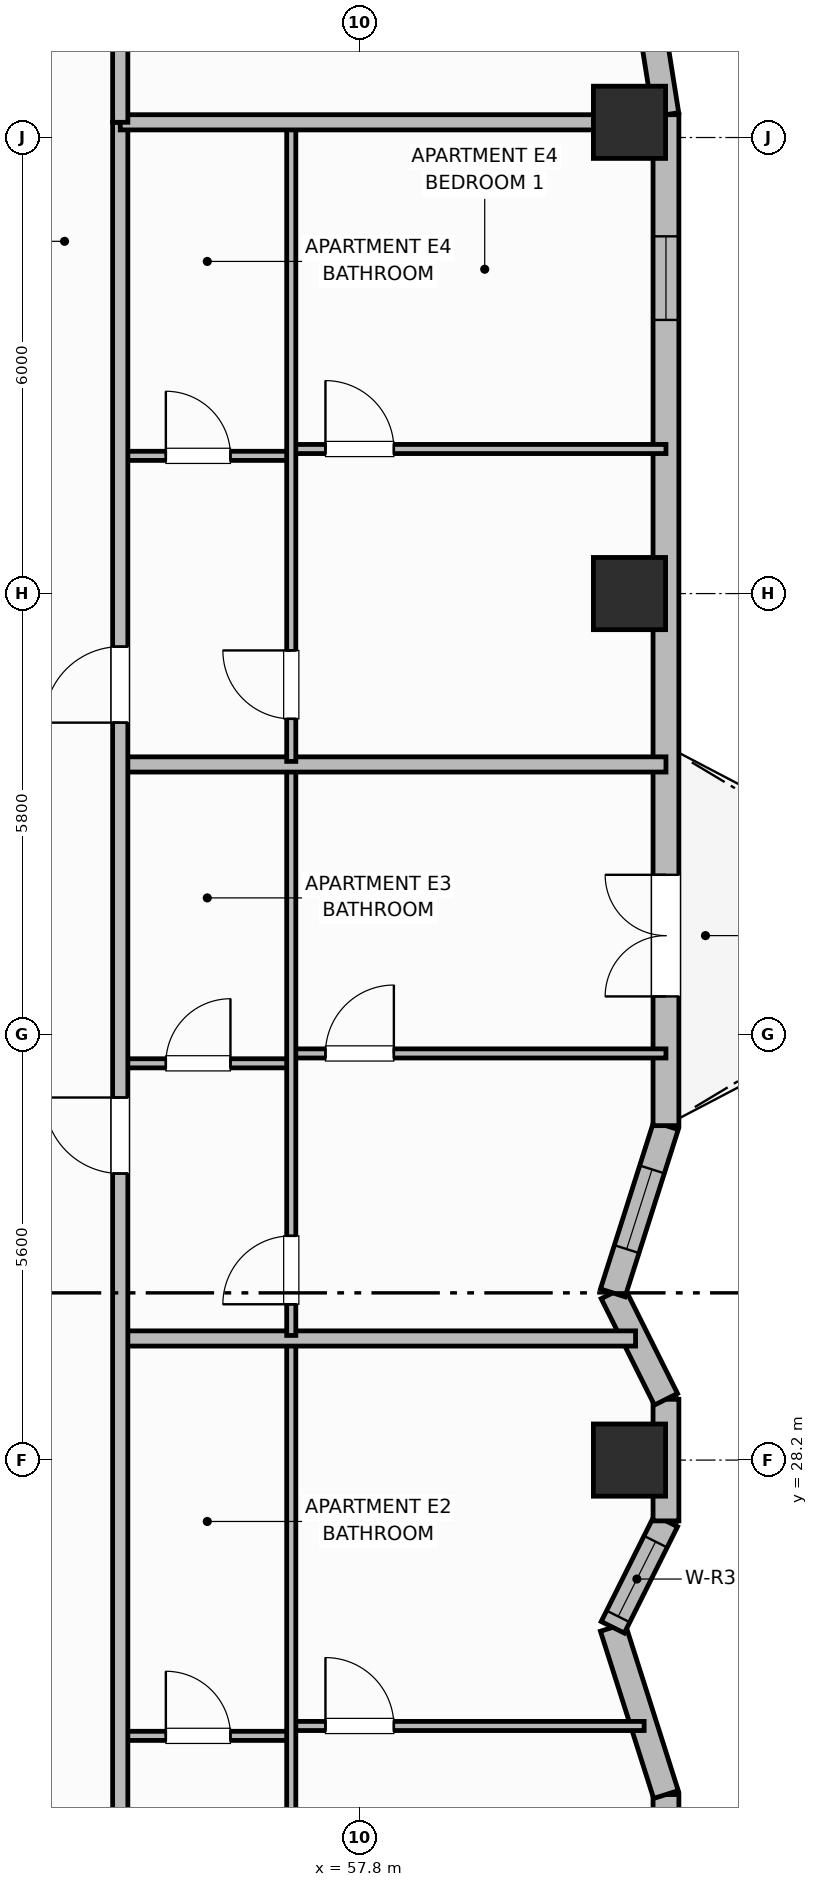
"""IFC4 building model, lengths in metres.
Left out: names, types, materials, properties, quantities, classifications, styles, units other than length and angle.
Written with IfcOpenShell. Run it as: python <this file> out.ifc"""

import sys

from ifc_helpers import new_model, si_unit, direction, frame, frame_2d, origin, origin_2d, place, context, subcontext, project, spatial, rectangle, extrude, element, fill, save


model = new_model("IFC4")
c1 = context("Model", 3, precision=1e-05, world=origin(), true_north=direction((0.0, 1.0)))
c2 = subcontext(c1, "Body", "Model", "MODEL_VIEW")
j1 = project(units=[si_unit("LENGTHUNIT", "METRE"), si_unit("PLANEANGLEUNIT", "RADIAN")], contexts=[c1])
p1 = place(None, origin())
s1 = spatial("IfcSite", under=j1, at=p1, CompositionType="ELEMENT")
p2 = place(p1, origin())
s2 = spatial("IfcBuilding", under=s1, at=p2, CompositionType="ELEMENT")
p3 = place(p2, frame((0.0, 0.0, 184.8)))
s3 = spatial("IfcBuildingStorey", under=s2, at=p3, CompositionType="ELEMENT", Elevation=184.8)
for number, where, z_axis, x_axis in (
    (1, (61.35, 28.2, 0.0), (0.0, 0.0, 1.0), (1.0, 0.0, 0.0)),
    (2, (61.35, 39.6, 0.0), (0.0, 0.0, 1.0), (1.0, 0.0, 0.0)),
    (3, (61.35, 45.8, 0.0), (0.0, 0.0, 1.0), (1.0, 0.0, 0.0)),
):
    element("IfcColumn", number, at=place(p3, frame(where, z_axis=z_axis, x_axis=x_axis)), inside=s3, PredefinedType="COLUMN", context=c2, shape_type="SweptSolid", body=[
        extrude(rectangle(XDim=0.95, YDim=0.95, at=origin_2d()), origin(), (0.0, 0.0, 1.0), 3.7),
    ])
p4 = place(p3, frame((61.83, 10.5, 0.0), z_axis=(0.0, 0.0, 1.0), x_axis=(0.0, 1.0, 0.0)))
e4 = element("IfcWall", 4, at=p4, inside=s3, PredefinedType="SOLIDWALL", context=c2, shape_type="SweptSolid", body=[
    extrude(rectangle(XDim=13.3, YDim=0.34, at=frame_2d((6.65, 0.0))), origin(), (0.0, 0.0, 1.0), 2.72),
])
p5 = place(p4, frame((1.45, 0.0, 0.75)))
e5 = element("IfcOpeningElement", 5, at=p5, cuts=e4, PredefinedType="OPENING", context=c2, shape_type="SweptSolid", body=[
    extrude(rectangle(XDim=1.4, YDim=1.85, at=frame_2d((0.7, 0.925))), frame((0.0, 0.18, 0.0), z_axis=(0.0, -1.0, 0.0), x_axis=(1.0, 0.0, 0.0)), (0.0, 0.0, 1.0), 0.36),
])
p6 = place(p4, frame((6.84, 0.0, 0.71)))
e6 = element("IfcOpeningElement", 6, at=p6, cuts=e4, PredefinedType="OPENING", context=c2, shape_type="SweptSolid", body=[
    extrude(rectangle(XDim=1.4, YDim=1.85, at=frame_2d((0.7, 0.925))), frame((0.0, 0.18, 0.0), z_axis=(0.0, -1.0, 0.0), x_axis=(1.0, 0.0, 0.0)), (0.0, 0.0, 1.0), 0.36),
])
p7 = place(p4, frame((10.45, 0.0, 0.75)))
e7 = element("IfcOpeningElement", 7, at=p7, cuts=e4, PredefinedType="OPENING", context=c2, shape_type="SweptSolid", body=[
    extrude(rectangle(XDim=1.4, YDim=1.85, at=frame_2d((0.7, 0.925))), frame((0.0, 0.18, 0.0), z_axis=(0.0, -1.0, 0.0), x_axis=(1.0, 0.0, 0.0)), (0.0, 0.0, 1.0), 0.36),
])
p8 = place(p3, frame((61.83, 23.8, 0.0), z_axis=(0.0, 0.0, 1.0), x_axis=(-0.303286588318, 0.95289938889, 0.0)))
e8 = element("IfcWall", 8, at=p8, inside=s3, PredefinedType="SOLIDWALL", context=c2, shape_type="SweptSolid", body=[
    extrude(rectangle(XDim=2.309, YDim=0.34, at=frame_2d((1.154, 0.0))), origin(), (0.0, 0.0, 1.0), 2.72),
])
p9 = place(p3, frame((61.13, 26.0, 0.0), z_axis=(0.0, 0.0, 1.0), x_axis=(0.447338371726, 0.894364792007, 0.0)))
e9 = element("IfcWall", 9, at=p9, inside=s3, PredefinedType="SOLIDWALL", context=c2, shape_type="SweptSolid", body=[
    extrude(rectangle(XDim=1.565, YDim=0.34, at=frame_2d((0.783, 0.0))), origin(), (0.0, 0.0, 1.0), 2.72),
])
p10 = place(p9, frame((0.16, 0.0, 0.91)))
e10 = element("IfcOpeningElement", 10, at=p10, cuts=e9, PredefinedType="OPENING", context=c2, shape_type="SweptSolid", body=[
    extrude(rectangle(XDim=1.1, YDim=1.65, at=frame_2d((0.55, 0.825))), frame((0.0, 0.18, 0.0), z_axis=(0.0, -1.0, 0.0), x_axis=(1.0, 0.0, 0.0)), (0.0, 0.0, 1.0), 0.36),
])
p11 = place(p3, frame((61.83, 27.4, 0.0), z_axis=(0.0, 0.0, 1.0), x_axis=(0.0, 1.0, 0.0)))
e11 = element("IfcWall", 11, at=p11, inside=s3, PredefinedType="SOLIDWALL", context=c2, shape_type="SweptSolid", body=[
    extrude(rectangle(XDim=1.6, YDim=0.34, at=frame_2d((0.8, 0.0))), origin(), (0.0, 0.0, 1.0), 2.72),
])
p12 = place(p3, frame((61.83, 29.0, 0.0), z_axis=(0.0, 0.0, 1.0), x_axis=(-0.447338371726, 0.894364792007, 0.0)))
e12 = element("IfcWall", 12, at=p12, inside=s3, PredefinedType="SOLIDWALL", context=c2, shape_type="SweptSolid", body=[
    extrude(rectangle(XDim=1.565, YDim=0.34, at=frame_2d((0.783, 0.0))), origin(), (0.0, 0.0, 1.0), 2.72),
])
p13 = place(p3, frame((61.13, 30.4, 0.0), z_axis=(0.0, 0.0, 1.0), x_axis=(0.303256029766, 0.952909114454, 0.0)))
e13 = element("IfcWall", 13, at=p13, inside=s3, PredefinedType="SOLIDWALL", context=c2, shape_type="SweptSolid", body=[
    extrude(rectangle(XDim=2.309, YDim=0.34, at=frame_2d((1.154, 0.0))), origin(), (0.0, 0.0, 1.0), 2.72),
])
p14 = place(p13, frame((0.604, 0.0, 0.91)))
e14 = element("IfcOpeningElement", 14, at=p14, cuts=e13, PredefinedType="OPENING", context=c2, shape_type="SweptSolid", body=[
    extrude(rectangle(XDim=1.1, YDim=1.65, at=frame_2d((0.55, 0.825))), frame((0.0, 0.18, 0.0), z_axis=(0.0, -1.0, 0.0), x_axis=(1.0, 0.0, 0.0)), (0.0, 0.0, 1.0), 0.36),
])
p15 = place(p3, frame((61.83, 32.6, 0.0), z_axis=(0.0, 0.0, 1.0), x_axis=(0.0, 1.0, 0.0)))
e15 = element("IfcWall", 15, at=p15, inside=s3, PredefinedType="SOLIDWALL", context=c2, shape_type="SweptSolid", body=[
    extrude(rectangle(XDim=13.3, YDim=0.34, at=frame_2d((6.65, 0.0))), origin(), (0.0, 0.0, 1.0), 2.72),
])
p16 = place(p15, frame((1.7, 0.0, 0.0)))
e16 = element("IfcOpeningElement", 16, at=p16, cuts=e15, PredefinedType="OPENING", context=c2, shape_type="SweptSolid", body=[
    extrude(rectangle(XDim=1.6, YDim=2.1, at=frame_2d((0.8, 1.05))), frame((0.0, 0.18, 0.0), z_axis=(0.0, -1.0, 0.0), x_axis=(1.0, 0.0, 0.0)), (0.0, 0.0, 1.0), 0.36),
])
p17 = place(p15, frame((10.6, 0.0, 0.95)))
e17 = element("IfcOpeningElement", 17, at=p17, cuts=e15, PredefinedType="OPENING", context=c2, shape_type="SweptSolid", body=[
    extrude(rectangle(XDim=1.1, YDim=1.65, at=frame_2d((0.55, 0.825))), frame((0.0, 0.18, 0.0), z_axis=(0.0, -1.0, 0.0), x_axis=(1.0, 0.0, 0.0)), (0.0, 0.0, 1.0), 0.36),
])
p18 = place(p3, frame((61.83, 45.9, 0.0), z_axis=(0.0, 0.0, 1.0), x_axis=(-0.156481329164, 0.987680916907, 0.0)))
e18 = element("IfcWall", 18, at=p18, inside=s3, PredefinedType="SOLIDWALL", context=c2, shape_type="SweptSolid", body=[
    extrude(rectangle(XDim=1.136, YDim=0.34, at=frame_2d((0.568, 0.0))), origin(), (0.0, 0.0, 1.0), 2.72),
])
p19 = place(p3, frame((54.65, 24.572, 0.0), z_axis=(0.0, 0.0, 1.0), x_axis=(1.0, 0.0, 0.0)))
e19 = element("IfcWall", 19, at=p19, inside=s3, PredefinedType="PARTITIONING", context=c2, shape_type="SweptSolid", body=[
    extrude(rectangle(XDim=2.25, YDim=0.12, at=frame_2d((1.125, 0.0))), origin(), (0.0, 0.0, 1.0), 2.55),
])
p20 = place(p19, frame((0.6, 0.0, 0.0)))
e20 = element("IfcOpeningElement", 20, at=p20, cuts=e19, PredefinedType="OPENING", context=c2, shape_type="SweptSolid", body=[
    extrude(rectangle(XDim=0.85, YDim=2.1, at=frame_2d((0.425, 1.05))), frame((0.0, 0.07, 0.0), z_axis=(0.0, -1.0, 0.0), x_axis=(1.0, 0.0, 0.0)), (0.0, 0.0, 1.0), 0.14),
])
p21 = place(p3, frame((56.9, 24.702, 0.0), z_axis=(0.0, 0.0, 1.0), x_axis=(1.0, 0.0, 0.0)))
e21 = element("IfcWall", 21, at=p21, inside=s3, PredefinedType="PARTITIONING", context=c2, shape_type="SweptSolid", body=[
    extrude(rectangle(XDim=4.643, YDim=0.12, at=frame_2d((2.322, 0.0))), origin(), (0.0, 0.0, 1.0), 2.55),
])
p22 = place(p21, frame((0.45, 0.0, 0.0)))
e22 = element("IfcOpeningElement", 22, at=p22, cuts=e21, PredefinedType="OPENING", context=c2, shape_type="SweptSolid", body=[
    extrude(rectangle(XDim=0.9, YDim=2.1, at=frame_2d((0.45, 1.05))), frame((0.0, 0.07, 0.0), z_axis=(0.0, -1.0, 0.0), x_axis=(1.0, 0.0, 0.0)), (0.0, 0.0, 1.0), 0.14),
])
p23 = place(p3, frame((56.9, 19.792, 0.0), z_axis=(0.0, 0.0, 1.0), x_axis=(0.0, 1.0, 0.0)))
e23 = element("IfcWall", 23, at=p23, inside=s3, PredefinedType="PARTITIONING", context=c2, shape_type="SweptSolid", body=[
    extrude(rectangle(XDim=9.968, YDim=0.12, at=frame_2d((4.984, 0.0))), origin(), (0.0, 0.0, 1.0), 2.55),
])
p24 = place(p23, frame((0.41, 0.0, 0.0)))
e24 = element("IfcOpeningElement", 24, at=p24, cuts=e23, PredefinedType="OPENING", context=c2, shape_type="SweptSolid", body=[
    extrude(rectangle(XDim=0.9, YDim=2.1, at=frame_2d((0.45, 1.05))), frame((0.0, 0.07, 0.0), z_axis=(0.0, -1.0, 0.0), x_axis=(1.0, 0.0, 0.0)), (0.0, 0.0, 1.0), 0.14),
])
p25 = place(p3, frame((54.65, 29.8, 0.0), z_axis=(0.0, 0.0, 1.0), x_axis=(1.0, 0.0, 0.0)))
e25 = element("IfcWall", 25, at=p25, inside=s3, PredefinedType="PARTITIONING", context=c2, shape_type="SweptSolid", body=[
    extrude(rectangle(XDim=6.78, YDim=0.2, at=frame_2d((3.39, 0.0))), origin(), (0.0, 0.0, 1.0), 2.55),
])
p26 = place(p3, frame((54.65, 33.42, 0.0), z_axis=(0.0, 0.0, 1.0), x_axis=(1.0, 0.0, 0.0)))
e26 = element("IfcWall", 26, at=p26, inside=s3, PredefinedType="PARTITIONING", context=c2, shape_type="SweptSolid", body=[
    extrude(rectangle(XDim=2.25, YDim=0.12, at=frame_2d((1.125, 0.0))), origin(), (0.0, 0.0, 1.0), 2.55),
])
p27 = place(p26, frame((0.6, 0.0, 0.0)))
e27 = element("IfcOpeningElement", 27, at=p27, cuts=e26, PredefinedType="OPENING", context=c2, shape_type="SweptSolid", body=[
    extrude(rectangle(XDim=0.85, YDim=2.1, at=frame_2d((0.425, 1.05))), frame((0.0, 0.07, 0.0), z_axis=(0.0, -1.0, 0.0), x_axis=(1.0, 0.0, 0.0)), (0.0, 0.0, 1.0), 0.14),
])
p28 = place(p3, frame((56.9, 33.55, 0.0), z_axis=(0.0, 0.0, 1.0), x_axis=(1.0, 0.0, 0.0)))
e28 = element("IfcWall", 28, at=p28, inside=s3, PredefinedType="PARTITIONING", context=c2, shape_type="SweptSolid", body=[
    extrude(rectangle(XDim=4.93, YDim=0.12, at=frame_2d((2.465, 0.0))), origin(), (0.0, 0.0, 1.0), 2.55),
])
p29 = place(p28, frame((0.45, 0.0, 0.0)))
e29 = element("IfcOpeningElement", 29, at=p29, cuts=e28, PredefinedType="OPENING", context=c2, shape_type="SweptSolid", body=[
    extrude(rectangle(XDim=0.9, YDim=2.1, at=frame_2d((0.45, 1.05))), frame((0.0, 0.07, 0.0), z_axis=(0.0, -1.0, 0.0), x_axis=(1.0, 0.0, 0.0)), (0.0, 0.0, 1.0), 0.14),
])
p30 = place(p3, frame((56.9, 29.84, 0.0), z_axis=(0.0, 0.0, 1.0), x_axis=(0.0, 1.0, 0.0)))
e30 = element("IfcWall", 30, at=p30, inside=s3, PredefinedType="PARTITIONING", context=c2, shape_type="SweptSolid", body=[
    extrude(rectangle(XDim=7.472, YDim=0.12, at=frame_2d((3.736, 0.0))), origin(), (0.0, 0.0, 1.0), 2.55),
])
p31 = place(p30, frame((0.41, 0.0, 0.0)))
e31 = element("IfcOpeningElement", 31, at=p31, cuts=e30, PredefinedType="OPENING", context=c2, shape_type="SweptSolid", body=[
    extrude(rectangle(XDim=0.9, YDim=2.1, at=frame_2d((0.45, 1.05))), frame((0.0, 0.07, 0.0), z_axis=(0.0, -1.0, 0.0), x_axis=(1.0, 0.0, 0.0)), (0.0, 0.0, 1.0), 0.14),
])
p32 = place(p3, frame((54.65, 37.352, 0.0), z_axis=(0.0, 0.0, 1.0), x_axis=(1.0, 0.0, 0.0)))
e32 = element("IfcWall", 32, at=p32, inside=s3, PredefinedType="PARTITIONING", context=c2, shape_type="SweptSolid", body=[
    extrude(rectangle(XDim=7.18, YDim=0.2, at=frame_2d((3.59, 0.0))), origin(), (0.0, 0.0, 1.0), 2.55),
])
p33 = place(p3, frame((54.65, 41.412, 0.0), z_axis=(0.0, 0.0, 1.0), x_axis=(1.0, 0.0, 0.0)))
e33 = element("IfcWall", 33, at=p33, inside=s3, PredefinedType="PARTITIONING", context=c2, shape_type="SweptSolid", body=[
    extrude(rectangle(XDim=2.25, YDim=0.12, at=frame_2d((1.125, 0.0))), origin(), (0.0, 0.0, 1.0), 2.55),
])
p34 = place(p33, frame((0.6, 0.0, 0.0)))
e34 = element("IfcOpeningElement", 34, at=p34, cuts=e33, PredefinedType="OPENING", context=c2, shape_type="SweptSolid", body=[
    extrude(rectangle(XDim=0.85, YDim=2.1, at=frame_2d((0.425, 1.05))), frame((0.0, 0.07, 0.0), z_axis=(0.0, -1.0, 0.0), x_axis=(1.0, 0.0, 0.0)), (0.0, 0.0, 1.0), 0.14),
])
p35 = place(p3, frame((56.9, 41.502, 0.0), z_axis=(0.0, 0.0, 1.0), x_axis=(1.0, 0.0, 0.0)))
e35 = element("IfcWall", 35, at=p35, inside=s3, PredefinedType="PARTITIONING", context=c2, shape_type="SweptSolid", body=[
    extrude(rectangle(XDim=4.93, YDim=0.12, at=frame_2d((2.465, 0.0))), origin(), (0.0, 0.0, 1.0), 2.55),
])
p36 = place(p35, frame((0.45, 0.0, 0.0)))
e36 = element("IfcOpeningElement", 36, at=p36, cuts=e35, PredefinedType="OPENING", context=c2, shape_type="SweptSolid", body=[
    extrude(rectangle(XDim=0.9, YDim=2.1, at=frame_2d((0.45, 1.05))), frame((0.0, 0.07, 0.0), z_axis=(0.0, -1.0, 0.0), x_axis=(1.0, 0.0, 0.0)), (0.0, 0.0, 1.0), 0.14),
])
p37 = place(p3, frame((56.9, 37.392, 0.0), z_axis=(0.0, 0.0, 1.0), x_axis=(0.0, 1.0, 0.0)))
e37 = element("IfcWall", 37, at=p37, inside=s3, PredefinedType="PARTITIONING", context=c2, shape_type="SweptSolid", body=[
    extrude(rectangle(XDim=8.368, YDim=0.12, at=frame_2d((4.184, 0.0))), origin(), (0.0, 0.0, 1.0), 2.55),
])
p38 = place(p37, frame((0.56, 0.0, 0.0)))
e38 = element("IfcOpeningElement", 38, at=p38, cuts=e37, PredefinedType="OPENING", context=c2, shape_type="SweptSolid", body=[
    extrude(rectangle(XDim=0.9, YDim=2.1, at=frame_2d((0.45, 1.05))), frame((0.0, 0.07, 0.0), z_axis=(0.0, -1.0, 0.0), x_axis=(1.0, 0.0, 0.0)), (0.0, 0.0, 1.0), 0.14),
])
p39 = place(p3, frame((54.65, 10.6, 0.0), z_axis=(0.0, 0.0, 1.0), x_axis=(0.0, 1.0, 0.0)))
e39 = element("IfcWall", 39, at=p39, inside=s3, PredefinedType="PARTITIONING", context=c2, shape_type="SweptSolid", body=[
    extrude(rectangle(XDim=35.2, YDim=0.2, at=frame_2d((17.6, 0.0))), origin(), (0.0, 0.0, 1.0), 2.55),
])
p40 = place(p39, frame((2.65, 0.0, 0.0)))
e40 = element("IfcOpeningElement", 40, at=p40, cuts=e39, PredefinedType="OPENING", context=c2, shape_type="SweptSolid", body=[
    extrude(rectangle(XDim=1.0, YDim=2.15, at=frame_2d((0.5, 1.075))), frame((0.0, 0.11, 0.0), z_axis=(0.0, -1.0, 0.0), x_axis=(1.0, 0.0, 0.0)), (0.0, 0.0, 1.0), 0.22),
])
p41 = place(p39, frame((11.352, 0.0, 0.0)))
e41 = element("IfcOpeningElement", 41, at=p41, cuts=e39, PredefinedType="OPENING", context=c2, shape_type="SweptSolid", body=[
    extrude(rectangle(XDim=1.0, YDim=2.15, at=frame_2d((0.5, 1.075))), frame((0.0, 0.11, 0.0), z_axis=(0.0, -1.0, 0.0), x_axis=(1.0, 0.0, 0.0)), (0.0, 0.0, 1.0), 0.22),
])
p42 = place(p39, frame((21.37, 0.0, 0.0)))
e42 = element("IfcOpeningElement", 42, at=p42, cuts=e39, PredefinedType="OPENING", context=c2, shape_type="SweptSolid", body=[
    extrude(rectangle(XDim=1.0, YDim=2.15, at=frame_2d((0.5, 1.075))), frame((0.0, 0.11, 0.0), z_axis=(0.0, -1.0, 0.0), x_axis=(1.0, 0.0, 0.0)), (0.0, 0.0, 1.0), 0.22),
])
p43 = place(p39, frame((27.302, 0.0, 0.0)))
e43 = element("IfcOpeningElement", 43, at=p43, cuts=e39, PredefinedType="OPENING", context=c2, shape_type="SweptSolid", body=[
    extrude(rectangle(XDim=1.0, YDim=2.15, at=frame_2d((0.5, 1.075))), frame((0.0, 0.11, 0.0), z_axis=(0.0, -1.0, 0.0), x_axis=(1.0, 0.0, 0.0)), (0.0, 0.0, 1.0), 0.22),
])
p44 = place(p3, frame((54.65, 45.8, 0.0), z_axis=(0.0, 0.0, 1.0), x_axis=(1.0, 0.0, 0.0)))
e44 = element("IfcWall", 44, at=p44, inside=s3, PredefinedType="PARTITIONING", context=c2, shape_type="SweptSolid", body=[
    extrude(rectangle(XDim=6.76, YDim=0.2, at=frame_2d((3.38, 0.0))), origin(), (0.0, 0.0, 1.0), 2.55),
])
p45 = place(p3, frame((54.65, 45.8, 0.0), z_axis=(0.0, 0.0, 1.0), x_axis=(0.0, 1.0, 0.0)))
e45 = element("IfcWall", 45, at=p45, inside=s3, PredefinedType="PARTITIONING", context=c2, shape_type="SweptSolid", body=[
    extrude(rectangle(XDim=3.73, YDim=0.2, at=frame_2d((1.865, 0.0))), origin(), (0.0, 0.0, 1.0), 2.55),
])
p46 = place(p10, origin())
e46 = element("IfcWindow", 46, at=p46, inside=s3, PartitioningType="SINGLE_PANEL", PredefinedType="WINDOW", context=c2, shape_type="SweptSolid", body=[
    extrude(rectangle(XDim=1.1, YDim=1.65, at=frame_2d((0.55, 0.825))), frame((0.0, 0.03, 0.0), z_axis=(0.0, -1.0, 0.0), x_axis=(1.0, 0.0, 0.0)), (0.0, 0.0, 1.0), 0.06),
])
fill(e10, e46)
p47 = place(p14, origin())
e47 = element("IfcWindow", 47, at=p47, inside=s3, PartitioningType="SINGLE_PANEL", PredefinedType="WINDOW", context=c2, shape_type="SweptSolid", body=[
    extrude(rectangle(XDim=1.1, YDim=1.65, at=frame_2d((0.55, 0.825))), frame((0.0, 0.03, 0.0), z_axis=(0.0, -1.0, 0.0), x_axis=(1.0, 0.0, 0.0)), (0.0, 0.0, 1.0), 0.06),
])
fill(e14, e47)
p48 = place(p16, origin())
e48 = element("IfcDoor", 48, at=p48, inside=s3, OperationType="DOUBLE_DOOR_SINGLE_SWING", PredefinedType="DOOR", context=c2, shape_type="SweptSolid", body=[
    extrude(rectangle(XDim=1.6, YDim=2.1, at=frame_2d((0.8, 1.05))), frame((0.0, 0.025, 0.0), z_axis=(0.0, -1.0, 0.0), x_axis=(1.0, 0.0, 0.0)), (0.0, 0.0, 1.0), 0.05),
])
fill(e16, e48)
p49 = place(p17, origin())
e49 = element("IfcWindow", 49, at=p49, inside=s3, PartitioningType="SINGLE_PANEL", PredefinedType="WINDOW", context=c2, shape_type="SweptSolid", body=[
    extrude(rectangle(XDim=1.1, YDim=1.65, at=frame_2d((0.55, 0.825))), frame((0.0, 0.03, 0.0), z_axis=(0.0, -1.0, 0.0), x_axis=(1.0, 0.0, 0.0)), (0.0, 0.0, 1.0), 0.06),
])
fill(e17, e49)
p50 = place(p20, origin())
e50 = element("IfcDoor", 50, at=p50, inside=s3, OperationType="SINGLE_SWING_LEFT", PredefinedType="DOOR", context=c2, shape_type="SweptSolid", body=[
    extrude(rectangle(XDim=0.85, YDim=2.1, at=frame_2d((0.425, 1.05))), frame((0.0, 0.025, 0.0), z_axis=(0.0, -1.0, 0.0), x_axis=(1.0, 0.0, 0.0)), (0.0, 0.0, 1.0), 0.05),
])
fill(e20, e50)
p51 = place(p22, origin())
e51 = element("IfcDoor", 51, at=p51, inside=s3, OperationType="SINGLE_SWING_LEFT", PredefinedType="DOOR", context=c2, shape_type="SweptSolid", body=[
    extrude(rectangle(XDim=0.9, YDim=2.1, at=frame_2d((0.45, 1.05))), frame((0.0, 0.025, 0.0), z_axis=(0.0, -1.0, 0.0), x_axis=(1.0, 0.0, 0.0)), (0.0, 0.0, 1.0), 0.05),
])
fill(e22, e51)
p52 = place(p27, origin())
e52 = element("IfcDoor", 52, at=p52, inside=s3, OperationType="SINGLE_SWING_RIGHT", PredefinedType="DOOR", context=c2, shape_type="SweptSolid", body=[
    extrude(rectangle(XDim=0.85, YDim=2.1, at=frame_2d((0.425, 1.05))), frame((0.0, 0.025, 0.0), z_axis=(0.0, -1.0, 0.0), x_axis=(1.0, 0.0, 0.0)), (0.0, 0.0, 1.0), 0.05),
])
fill(e27, e52)
p53 = place(p29, origin())
e53 = element("IfcDoor", 53, at=p53, inside=s3, OperationType="SINGLE_SWING_RIGHT", PredefinedType="DOOR", context=c2, shape_type="SweptSolid", body=[
    extrude(rectangle(XDim=0.9, YDim=2.1, at=frame_2d((0.45, 1.05))), frame((0.0, 0.025, 0.0), z_axis=(0.0, -1.0, 0.0), x_axis=(1.0, 0.0, 0.0)), (0.0, 0.0, 1.0), 0.05),
])
fill(e29, e53)
p54 = place(p31, origin())
e54 = element("IfcDoor", 54, at=p54, inside=s3, OperationType="SINGLE_SWING_LEFT", PredefinedType="DOOR", context=c2, shape_type="SweptSolid", body=[
    extrude(rectangle(XDim=0.9, YDim=2.1, at=frame_2d((0.45, 1.05))), frame((0.0, 0.025, 0.0), z_axis=(0.0, -1.0, 0.0), x_axis=(1.0, 0.0, 0.0)), (0.0, 0.0, 1.0), 0.05),
])
fill(e31, e54)
p55 = place(p34, origin())
e55 = element("IfcDoor", 55, at=p55, inside=s3, OperationType="SINGLE_SWING_LEFT", PredefinedType="DOOR", context=c2, shape_type="SweptSolid", body=[
    extrude(rectangle(XDim=0.85, YDim=2.1, at=frame_2d((0.425, 1.05))), frame((0.0, 0.025, 0.0), z_axis=(0.0, -1.0, 0.0), x_axis=(1.0, 0.0, 0.0)), (0.0, 0.0, 1.0), 0.05),
])
fill(e34, e55)
p56 = place(p36, origin())
e56 = element("IfcDoor", 56, at=p56, inside=s3, OperationType="SINGLE_SWING_LEFT", PredefinedType="DOOR", context=c2, shape_type="SweptSolid", body=[
    extrude(rectangle(XDim=0.9, YDim=2.1, at=frame_2d((0.45, 1.05))), frame((0.0, 0.025, 0.0), z_axis=(0.0, -1.0, 0.0), x_axis=(1.0, 0.0, 0.0)), (0.0, 0.0, 1.0), 0.05),
])
fill(e36, e56)
p57 = place(p38, origin())
e57 = element("IfcDoor", 57, at=p57, inside=s3, OperationType="SINGLE_SWING_RIGHT", PredefinedType="DOOR", context=c2, shape_type="SweptSolid", body=[
    extrude(rectangle(XDim=0.9, YDim=2.1, at=frame_2d((0.45, 1.05))), frame((0.0, 0.025, 0.0), z_axis=(0.0, -1.0, 0.0), x_axis=(1.0, 0.0, 0.0)), (0.0, 0.0, 1.0), 0.05),
])
fill(e38, e57)
p58 = place(p42, origin())
e58 = element("IfcDoor", 58, at=p58, inside=s3, OperationType="SINGLE_SWING_RIGHT", PredefinedType="DOOR", context=c2, shape_type="SweptSolid", body=[
    extrude(rectangle(XDim=1.0, YDim=2.15, at=frame_2d((0.5, 1.075))), frame((0.0, 0.025, 0.0), z_axis=(0.0, -1.0, 0.0), x_axis=(1.0, 0.0, 0.0)), (0.0, 0.0, 1.0), 0.05),
])
fill(e42, e58)
p59 = place(p43, origin())
e59 = element("IfcDoor", 59, at=p59, inside=s3, OperationType="SINGLE_SWING_LEFT", PredefinedType="DOOR", context=c2, shape_type="SweptSolid", body=[
    extrude(rectangle(XDim=1.0, YDim=2.15, at=frame_2d((0.5, 1.075))), frame((0.0, 0.025, 0.0), z_axis=(0.0, -1.0, 0.0), x_axis=(1.0, 0.0, 0.0)), (0.0, 0.0, 1.0), 0.05),
])
fill(e43, e59)
save(model, sys.argv[1])
